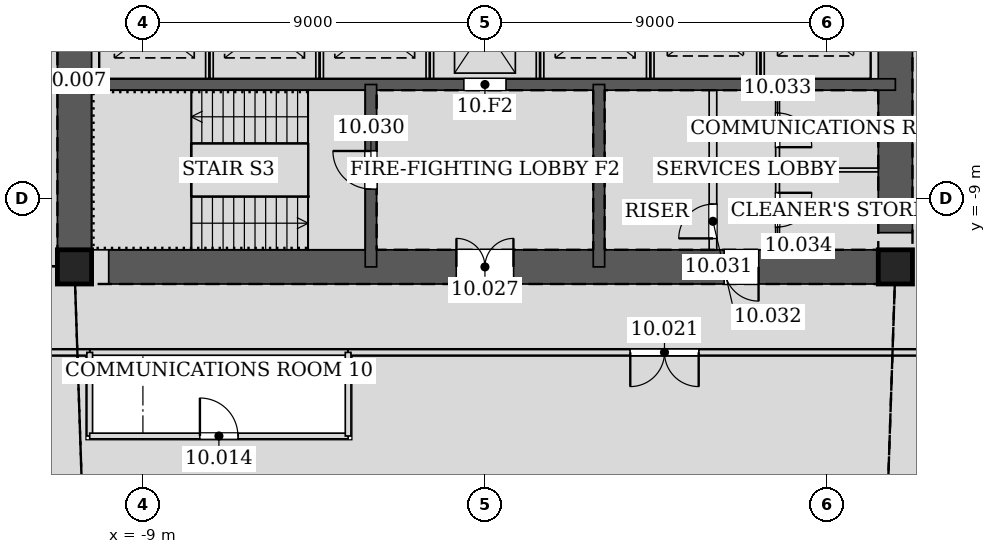
"""IFC4 building model, lengths in metres.
Left out: names, types, materials, properties, quantities, classifications, styles, units other than length and angle.
Written with IfcOpenShell. Run it as: python <this file> out.ifc"""

import sys

from ifc_helpers import new_model, si_unit, direction, frame, frame_2d, origin, origin_2d, place, context, subcontext, project, spatial, rectangle, hollow_rectangle, extrude, element, fill, save


model = new_model("IFC4")
c1 = context("Model", 3, precision=1e-05, world=origin(), true_north=direction((0.0, 1.0)))
c2 = subcontext(c1, "Body", "Model", "MODEL_VIEW")
j1 = project(units=[si_unit("LENGTHUNIT", "METRE"), si_unit("PLANEANGLEUNIT", "RADIAN")], contexts=[c1])
p1 = place(None, origin())
s1 = spatial("IfcSite", under=j1, at=p1, CompositionType="ELEMENT")
p2 = place(p1, origin())
s2 = spatial("IfcBuilding", under=s1, at=p2, CompositionType="ELEMENT")
p3 = place(p2, frame((0.0, 0.0, 49.8)))
s3 = spatial("IfcBuildingStorey", under=s2, at=p3, CompositionType="ELEMENT", Elevation=49.8)
for number, where, z_axis, x_axis in (
    (1, (-10.8, -10.8, 0.0), (0.0, 0.0, 1.0), (1.0, 0.0, 0.0)),
    (2, (10.8, -10.8, 0.0), (0.0, 0.0, 1.0), (1.0, 0.0, 0.0)),
):
    element("IfcColumn", number, at=place(p3, frame(where, z_axis=z_axis, x_axis=x_axis)), inside=s3, PredefinedType="COLUMN", context=c2, shape_type="SweptSolid", body=[
        extrude(hollow_rectangle(XDim=0.9, YDim=0.9, WallThickness=0.06, at=origin_2d()), origin(), (0.0, 0.0, 1.0), 4.2),
    ])
p4 = place(p3, frame((-10.8, -10.8, 0.0), z_axis=(0.0, 0.0, 1.0), x_axis=(1.0, 0.0, 0.0)))
e3 = element("IfcWall", 3, at=p4, inside=s3, PredefinedType="SOLIDWALL", context=c2, shape_type="SweptSolid", body=[
    extrude(rectangle(XDim=21.6, YDim=0.9, at=frame_2d((10.8, 0.0))), origin(), (0.0, 0.0, 1.0), 4.2),
])
p5 = place(p4, frame((10.05, 0.0, 0.0)))
e4 = element("IfcOpeningElement", 4, at=p5, cuts=e3, PredefinedType="OPENING", context=c2, shape_type="SweptSolid", body=[
    extrude(rectangle(XDim=1.5, YDim=2.1, at=frame_2d((0.75, 1.05))), frame((0.0, 0.46, 0.0), z_axis=(0.0, -1.0, 0.0), x_axis=(1.0, 0.0, 0.0)), (0.0, 0.0, 1.0), 0.92),
])
p6 = place(p4, frame((17.1, 0.0, 0.0)))
e5 = element("IfcOpeningElement", 5, at=p6, cuts=e3, PredefinedType="OPENING", context=c2, shape_type="SweptSolid", body=[
    extrude(rectangle(XDim=0.9, YDim=2.1, at=frame_2d((0.45, 1.05))), frame((0.0, 0.46, 0.0), z_axis=(0.0, -1.0, 0.0), x_axis=(1.0, 0.0, 0.0)), (0.0, 0.0, 1.0), 0.92),
])
p7 = place(p3, frame((10.8, -10.8, 0.0), z_axis=(0.0, 0.0, 1.0), x_axis=(0.0, 1.0, 0.0)))
e6 = element("IfcWall", 6, at=p7, inside=s3, PredefinedType="SOLIDWALL", context=c2, shape_type="SweptSolid", body=[
    extrude(rectangle(XDim=21.6, YDim=0.9, at=frame_2d((10.8, 0.0))), origin(), (0.0, 0.0, 1.0), 4.2),
])
p8 = place(p7, frame((11.7, 0.0, 0.0)))
e7 = element("IfcOpeningElement", 7, at=p8, cuts=e6, PredefinedType="OPENING", context=c2, shape_type="SweptSolid", body=[
    extrude(rectangle(XDim=1.2, YDim=2.1, at=frame_2d((0.6, 1.05))), frame((0.0, 0.46, 0.0), z_axis=(0.0, -1.0, 0.0), x_axis=(1.0, 0.0, 0.0)), (0.0, 0.0, 1.0), 0.92),
])
p9 = place(p7, frame((8.7, 0.0, 0.0)))
e8 = element("IfcOpeningElement", 8, at=p9, cuts=e6, PredefinedType="OPENING", context=c2, shape_type="SweptSolid", body=[
    extrude(rectangle(XDim=1.2, YDim=2.1, at=frame_2d((0.6, 1.05))), frame((0.0, 0.46, 0.0), z_axis=(0.0, -1.0, 0.0), x_axis=(1.0, 0.0, 0.0)), (0.0, 0.0, 1.0), 0.92),
])
p10 = place(p3, frame((-10.8, 10.8, 0.0), z_axis=(0.0, 0.0, 1.0), x_axis=(0.0, -1.0, 0.0)))
e9 = element("IfcWall", 9, at=p10, inside=s3, PredefinedType="SOLIDWALL", context=c2, shape_type="SweptSolid", body=[
    extrude(rectangle(XDim=21.6, YDim=0.9, at=frame_2d((10.8, 0.0))), origin(), (0.0, 0.0, 1.0), 4.2),
])
p11 = place(p10, frame((8.7, 0.0, 0.0)))
e10 = element("IfcOpeningElement", 10, at=p11, cuts=e9, PredefinedType="OPENING", context=c2, shape_type="SweptSolid", body=[
    extrude(rectangle(XDim=1.2, YDim=2.1, at=frame_2d((0.6, 1.05))), frame((0.0, 0.46, 0.0), z_axis=(0.0, -1.0, 0.0), x_axis=(1.0, 0.0, 0.0)), (0.0, 0.0, 1.0), 0.92),
])
p12 = place(p10, frame((11.7, 0.0, 0.0)))
e11 = element("IfcOpeningElement", 11, at=p12, cuts=e9, PredefinedType="OPENING", context=c2, shape_type="SweptSolid", body=[
    extrude(rectangle(XDim=1.2, YDim=2.1, at=frame_2d((0.6, 1.05))), frame((0.0, 0.46, 0.0), z_axis=(0.0, -1.0, 0.0), x_axis=(1.0, 0.0, 0.0)), (0.0, 0.0, 1.0), 0.92),
])
p13 = place(p3, frame((-10.8, -6.0, 0.0), z_axis=(0.0, 0.0, 1.0), x_axis=(1.0, 0.0, 0.0)))
e12 = element("IfcWall", 12, at=p13, inside=s3, PredefinedType="SOLIDWALL", context=c2, shape_type="SweptSolid", body=[
    extrude(rectangle(XDim=21.6, YDim=0.3, at=frame_2d((10.8, 0.0))), origin(), (0.0, 0.0, 1.0), 4.2),
])
p14 = place(p13, frame((10.25, 0.0, 0.0)))
e13 = element("IfcOpeningElement", 13, at=p14, cuts=e12, PredefinedType="OPENING", context=c2, shape_type="SweptSolid", body=[
    extrude(rectangle(XDim=1.1, YDim=2.1, at=frame_2d((0.55, 1.05))), frame((0.0, 0.16, 0.0), z_axis=(0.0, -1.0, 0.0), x_axis=(1.0, 0.0, 0.0)), (0.0, 0.0, 1.0), 0.32),
])
p15 = place(p3, frame((-3.0, -6.0, 0.0), z_axis=(0.0, 0.0, 1.0), x_axis=(0.0, -1.0, 0.0)))
e14 = element("IfcWall", 14, at=p15, inside=s3, PredefinedType="SOLIDWALL", context=c2, shape_type="SweptSolid", body=[
    extrude(rectangle(XDim=4.8, YDim=0.3, at=frame_2d((2.4, 0.0))), origin(), (0.0, 0.0, 1.0), 4.2),
])
p16 = place(p15, frame((1.75, 0.0, 0.0)))
e15 = element("IfcOpeningElement", 15, at=p16, cuts=e14, PredefinedType="OPENING", context=c2, shape_type="SweptSolid", body=[
    extrude(rectangle(XDim=1.0, YDim=2.1, at=frame_2d((0.5, 1.05))), frame((0.0, 0.16, 0.0), z_axis=(0.0, -1.0, 0.0), x_axis=(1.0, 0.0, 0.0)), (0.0, 0.0, 1.0), 0.32),
])
p17 = place(p3, frame((3.0, -6.0, 0.0), z_axis=(0.0, 0.0, 1.0), x_axis=(0.0, -1.0, 0.0)))
e16 = element("IfcWall", 16, at=p17, inside=s3, PredefinedType="SOLIDWALL", context=c2, shape_type="SweptSolid", body=[
    extrude(rectangle(XDim=4.8, YDim=0.3, at=frame_2d((2.4, 0.0))), origin(), (0.0, 0.0, 1.0), 4.2),
])
p18 = place(p3, frame((-10.401, -13.05, 0.0), z_axis=(0.0, 0.0, 1.0), x_axis=(1.0, 0.0, 0.0)))
e17 = element("IfcWall", 17, at=p18, inside=s3, PredefinedType="PARTITIONING", context=c2, shape_type="SweptSolid", body=[
    extrude(rectangle(XDim=6.802, YDim=0.15, at=frame_2d((3.401, 0.0))), origin(), (0.0, 0.0, 1.0), 4.035),
])
p19 = place(p3, frame((-13.05, -13.05, 0.0), z_axis=(0.0, 0.0, 1.0), x_axis=(1.0, 0.0, 0.0)))
e18 = element("IfcWall", 18, at=p19, inside=s3, PredefinedType="PARTITIONING", context=c2, shape_type="SweptSolid", body=[
    extrude(rectangle(XDim=2.651, YDim=0.15, at=frame_2d((1.326, 0.0))), origin(), (0.0, 0.0, 1.0), 3.014),
])
p20 = place(p3, frame((-3.601, -13.05, 0.0), z_axis=(0.0, 0.0, 1.0), x_axis=(1.0, 0.0, 0.0)))
e19 = element("IfcWall", 19, at=p20, inside=s3, PredefinedType="PARTITIONING", context=c2, shape_type="SweptSolid", body=[
    extrude(rectangle(XDim=16.651, YDim=0.15, at=frame_2d((8.326, 0.0))), origin(), (0.0, 0.0, 1.0), 2.984),
])
p21 = place(p20, frame((7.426, 0.0, 0.0)))
e20 = element("IfcOpeningElement", 20, at=p21, cuts=e19, PredefinedType="OPENING", context=c2, shape_type="SweptSolid", body=[
    extrude(rectangle(XDim=1.8, YDim=2.4, at=frame_2d((0.9, 1.2))), frame((0.0, 0.085, 0.0), z_axis=(0.0, -1.0, 0.0), x_axis=(1.0, 0.0, 0.0)), (0.0, 0.0, 1.0), 0.17),
])
p22 = place(p3, frame((-10.4, -13.05, 0.0), z_axis=(0.0, 0.0, 1.0), x_axis=(0.0, -1.0, 0.0)))
e21 = element("IfcWall", 21, at=p22, inside=s3, PredefinedType="PARTITIONING", context=c2, shape_type="SweptSolid", body=[
    extrude(rectangle(XDim=2.2, YDim=0.15, at=frame_2d((1.1, 0.0))), origin(), (0.0, 0.0, 1.0), 3.014),
])
p23 = place(p3, frame((-10.4, -15.25, 0.0), z_axis=(0.0, 0.0, 1.0), x_axis=(1.0, 0.0, 0.0)))
e22 = element("IfcWall", 22, at=p23, inside=s3, PredefinedType="PARTITIONING", context=c2, shape_type="SweptSolid", body=[
    extrude(rectangle(XDim=6.8, YDim=0.15, at=frame_2d((3.4, 0.0))), origin(), (0.0, 0.0, 1.0), 4.035),
])
p24 = place(p23, frame((2.9, 0.0, 0.0)))
e23 = element("IfcOpeningElement", 23, at=p24, cuts=e22, PredefinedType="OPENING", context=c2, shape_type="SweptSolid", body=[
    extrude(rectangle(XDim=1.0, YDim=2.1, at=frame_2d((0.5, 1.05))), frame((0.0, 0.085, 0.0), z_axis=(0.0, -1.0, 0.0), x_axis=(1.0, 0.0, 0.0)), (0.0, 0.0, 1.0), 0.17),
])
p25 = place(p3, frame((-3.6, -15.25, 0.0), z_axis=(0.0, 0.0, 1.0), x_axis=(0.0, 1.0, 0.0)))
e24 = element("IfcWall", 24, at=p25, inside=s3, PredefinedType="PARTITIONING", context=c2, shape_type="SweptSolid", body=[
    extrude(rectangle(XDim=2.2, YDim=0.15, at=frame_2d((1.1, 0.0))), origin(), (0.0, 0.0, 1.0), 3.423),
])
for number, where, z_axis, x_axis in (
    (25, (-7.25, -5.85, 0.0), (0.0, 0.0, 1.0), (0.0, 1.0, 0.0)),
    (26, (-4.35, -5.85, 0.0), (0.0, 0.0, 1.0), (0.0, 1.0, 0.0)),
    (27, (-1.45, -5.85, 0.0), (0.0, 0.0, 1.0), (0.0, 1.0, 0.0)),
    (28, (1.45, -5.85, 0.0), (0.0, 0.0, 1.0), (0.0, 1.0, 0.0)),
    (29, (4.35, -5.85, 0.0), (0.0, 0.0, 1.0), (0.0, 1.0, 0.0)),
    (30, (7.25, -5.85, 0.0), (0.0, 0.0, 1.0), (0.0, 1.0, 0.0)),
):
    element("IfcWall", number, at=place(p3, frame(where, z_axis=z_axis, x_axis=x_axis)), inside=s3, PredefinedType="PARTITIONING", context=c2, shape_type="SweptSolid", body=[
        extrude(rectangle(XDim=2.7, YDim=0.2, at=frame_2d((1.35, 0.0))), origin(), (0.0, 0.0, 1.0), 4.2),
    ])
p26 = place(p3, frame((6.0, -10.35, 0.0), z_axis=(0.0, 0.0, 1.0), x_axis=(0.0, 1.0, 0.0)))
e31 = element("IfcWall", 31, at=p26, inside=s3, PredefinedType="PARTITIONING", context=c2, shape_type="SweptSolid", body=[
    extrude(rectangle(XDim=4.2, YDim=0.2, at=frame_2d((2.1, 0.0))), origin(), (0.0, 0.0, 1.0), 4.035),
])
p27 = place(p26, frame((0.3, 0.0, 0.0)))
e32 = element("IfcOpeningElement", 32, at=p27, cuts=e31, PredefinedType="OPENING", context=c2, shape_type="SweptSolid", body=[
    extrude(rectangle(XDim=0.9, YDim=2.1, at=frame_2d((0.45, 1.05))), frame((0.0, 0.11, 0.0), z_axis=(0.0, -1.0, 0.0), x_axis=(1.0, 0.0, 0.0)), (0.0, 0.0, 1.0), 0.22),
])
p28 = place(p3, frame((7.7, -10.35, 0.0), z_axis=(0.0, 0.0, 1.0), x_axis=(0.0, 1.0, 0.0)))
e33 = element("IfcWall", 33, at=p28, inside=s3, PredefinedType="PARTITIONING", context=c2, shape_type="SweptSolid", body=[
    extrude(rectangle(XDim=4.2, YDim=0.1, at=frame_2d((2.1, 0.0))), origin(), (0.0, 0.0, 1.0), 4.035),
])
p29 = place(p28, frame((2.7, 0.0, 0.0)))
e34 = element("IfcOpeningElement", 34, at=p29, cuts=e33, PredefinedType="OPENING", context=c2, shape_type="SweptSolid", body=[
    extrude(rectangle(XDim=0.9, YDim=2.1, at=frame_2d((0.45, 1.05))), frame((0.0, 0.06, 0.0), z_axis=(0.0, -1.0, 0.0), x_axis=(1.0, 0.0, 0.0)), (0.0, 0.0, 1.0), 0.12),
])
p30 = place(p28, frame((0.6, 0.0, 0.0)))
e35 = element("IfcOpeningElement", 35, at=p30, cuts=e33, PredefinedType="OPENING", context=c2, shape_type="SweptSolid", body=[
    extrude(rectangle(XDim=0.9, YDim=2.1, at=frame_2d((0.45, 1.05))), frame((0.0, 0.06, 0.0), z_axis=(0.0, -1.0, 0.0), x_axis=(1.0, 0.0, 0.0)), (0.0, 0.0, 1.0), 0.12),
])
p31 = place(p3, frame((7.7, -8.25, 0.0), z_axis=(0.0, 0.0, 1.0), x_axis=(1.0, 0.0, 0.0)))
e36 = element("IfcWall", 36, at=p31, inside=s3, PredefinedType="PARTITIONING", context=c2, shape_type="SweptSolid", body=[
    extrude(rectangle(XDim=2.65, YDim=0.1, at=frame_2d((1.325, 0.0))), origin(), (0.0, 0.0, 1.0), 4.035),
])
p32 = place(p24, origin())
e37 = element("IfcDoor", 37, at=p32, inside=s3, OperationType="SINGLE_SWING_LEFT", PredefinedType="DOOR", context=c2, shape_type="SweptSolid", body=[
    extrude(rectangle(XDim=1.0, YDim=2.1, at=frame_2d((0.5, 1.05))), frame((0.0, 0.025, 0.0), z_axis=(0.0, -1.0, 0.0), x_axis=(1.0, 0.0, 0.0)), (0.0, 0.0, 1.0), 0.05),
])
fill(e23, e37)
p33 = place(p21, frame((1.8, 0.0, 0.0), z_axis=(0.0, 0.0, 1.0), x_axis=(-1.0, 0.0, 0.0)))
e38 = element("IfcDoor", 38, at=p33, inside=s3, OperationType="DOUBLE_DOOR_SINGLE_SWING", PredefinedType="DOOR", context=c2, shape_type="SweptSolid", body=[
    extrude(rectangle(XDim=1.8, YDim=2.4, at=frame_2d((0.9, 1.2))), frame((0.0, 0.025, 0.0), z_axis=(0.0, -1.0, 0.0), x_axis=(1.0, 0.0, 0.0)), (0.0, 0.0, 1.0), 0.05),
])
fill(e20, e38)
p34 = place(p5, origin())
e39 = element("IfcDoor", 39, at=p34, inside=s3, OperationType="DOUBLE_DOOR_SINGLE_SWING", PredefinedType="DOOR", context=c2, shape_type="SweptSolid", body=[
    extrude(rectangle(XDim=1.5, YDim=2.1, at=frame_2d((0.75, 1.05))), frame((0.0, 0.025, 0.0), z_axis=(0.0, -1.0, 0.0), x_axis=(1.0, 0.0, 0.0)), (0.0, 0.0, 1.0), 0.05),
])
fill(e4, e39)
p35 = place(p16, frame((1.0, 0.0, 0.0), z_axis=(0.0, 0.0, 1.0), x_axis=(-1.0, 0.0, 0.0)))
e40 = element("IfcDoor", 40, at=p35, inside=s3, OperationType="SINGLE_SWING_RIGHT", PredefinedType="DOOR", context=c2, shape_type="SweptSolid", body=[
    extrude(rectangle(XDim=1.0, YDim=2.1, at=frame_2d((0.5, 1.05))), frame((0.0, 0.025, 0.0), z_axis=(0.0, -1.0, 0.0), x_axis=(1.0, 0.0, 0.0)), (0.0, 0.0, 1.0), 0.05),
])
fill(e15, e40)
p36 = place(p6, frame((0.9, 0.0, 0.0), z_axis=(0.0, 0.0, 1.0), x_axis=(-1.0, 0.0, 0.0)))
e41 = element("IfcDoor", 41, at=p36, inside=s3, OperationType="SINGLE_SWING_LEFT", PredefinedType="DOOR", context=c2, shape_type="SweptSolid", body=[
    extrude(rectangle(XDim=0.9, YDim=2.1, at=frame_2d((0.45, 1.05))), frame((0.0, 0.025, 0.0), z_axis=(0.0, -1.0, 0.0), x_axis=(1.0, 0.0, 0.0)), (0.0, 0.0, 1.0), 0.05),
])
fill(e5, e41)
p37 = place(p27, origin())
e42 = element("IfcDoor", 42, at=p37, inside=s3, OperationType="SINGLE_SWING_LEFT", PredefinedType="DOOR", context=c2, shape_type="SweptSolid", body=[
    extrude(rectangle(XDim=0.9, YDim=2.1, at=frame_2d((0.45, 1.05))), frame((0.0, 0.025, 0.0), z_axis=(0.0, -1.0, 0.0), x_axis=(1.0, 0.0, 0.0)), (0.0, 0.0, 1.0), 0.05),
])
fill(e32, e42)
p38 = place(p29, frame((0.9, 0.0, 0.0), z_axis=(0.0, 0.0, 1.0), x_axis=(-1.0, 0.0, 0.0)))
e43 = element("IfcDoor", 43, at=p38, inside=s3, OperationType="SINGLE_SWING_RIGHT", PredefinedType="DOOR", context=c2, shape_type="SweptSolid", body=[
    extrude(rectangle(XDim=0.9, YDim=2.1, at=frame_2d((0.45, 1.05))), frame((0.0, 0.025, 0.0), z_axis=(0.0, -1.0, 0.0), x_axis=(1.0, 0.0, 0.0)), (0.0, 0.0, 1.0), 0.05),
])
fill(e34, e43)
p39 = place(p30, frame((0.9, 0.0, 0.0), z_axis=(0.0, 0.0, 1.0), x_axis=(-1.0, 0.0, 0.0)))
e44 = element("IfcDoor", 44, at=p39, inside=s3, OperationType="SINGLE_SWING_LEFT", PredefinedType="DOOR", context=c2, shape_type="SweptSolid", body=[
    extrude(rectangle(XDim=0.9, YDim=2.1, at=frame_2d((0.45, 1.05))), frame((0.0, 0.025, 0.0), z_axis=(0.0, -1.0, 0.0), x_axis=(1.0, 0.0, 0.0)), (0.0, 0.0, 1.0), 0.05),
])
fill(e35, e44)
p40 = place(p14, origin())
e45 = element("IfcDoor", 45, at=p40, inside=s3, OperationType="DOUBLE_DOOR_SLIDING", PredefinedType="DOOR", context=c2, shape_type="SweptSolid", body=[
    extrude(rectangle(XDim=1.1, YDim=2.1, at=frame_2d((0.55, 1.05))), frame((0.0, 0.025, 0.0), z_axis=(0.0, -1.0, 0.0), x_axis=(1.0, 0.0, 0.0)), (0.0, 0.0, 1.0), 0.05),
])
fill(e13, e45)
save(model, sys.argv[1])
